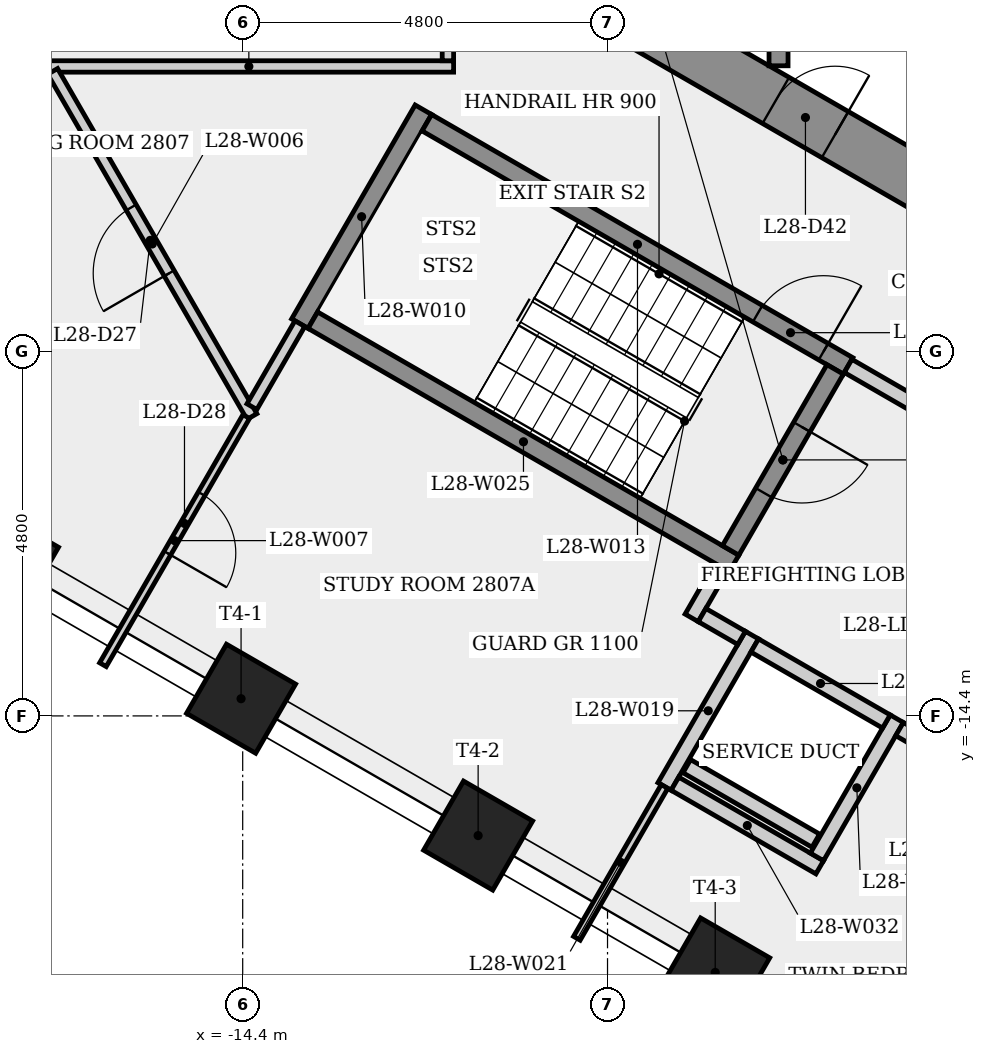
"""IFC4 building model, lengths in metres.
Left out: names, types, materials, properties, quantities, classifications, styles, units other than length and angle.
Written with IfcOpenShell. Run it as: python <this file> out.ifc"""

import sys

from ifc_helpers import new_model, si_unit, direction, frame, frame_2d, origin, origin_2d, place, context, subcontext, project, spatial, rectangle, extrude, element, fill, save


model = new_model("IFC4")
c1 = context("Model", 3, precision=1e-05, world=origin(), true_north=direction((0.0, 1.0)))
c2 = subcontext(c1, "Body", "Model", "MODEL_VIEW")
j1 = project(units=[si_unit("LENGTHUNIT", "METRE"), si_unit("PLANEANGLEUNIT", "RADIAN")], contexts=[c1])
p1 = place(None, origin())
s1 = spatial("IfcSite", under=j1, at=p1, CompositionType="ELEMENT")
p2 = place(p1, origin())
s2 = spatial("IfcBuilding", under=s1, at=p2, CompositionType="ELEMENT")
p3 = place(p2, frame((0.0, 0.0, 106.9)))
s3 = spatial("IfcBuildingStorey", under=s2, at=p3, CompositionType="ELEMENT", Elevation=106.9)
p4 = place(p3, frame((-9.325, -5.182, 0.0), z_axis=(0.0, 0.0, 1.0), x_axis=(0.866023993627, -0.500002442456, 0.0)))
e1 = element("IfcWall", 1, at=p4, inside=s3, PredefinedType="SHEAR", context=c2, shape_type="SweptSolid", body=[
    extrude(rectangle(XDim=10.97, YDim=0.7, at=frame_2d((5.485, 0.0))), origin(), (0.0, 0.0, 1.0), 3.4),
])
p5 = place(p4, frame((2.239, 0.0, 0.0)))
e2 = element("IfcOpeningElement", 2, at=p5, cuts=e1, PredefinedType="OPENING", context=c2, shape_type="SweptSolid", body=[
    extrude(rectangle(XDim=0.9, YDim=2.1, at=frame_2d((0.45, 1.05))), frame((0.0, 0.36, 0.0), z_axis=(0.0, -1.0, 0.0), x_axis=(1.0, 0.0, 0.0)), (0.0, 0.0, 1.0), 0.72),
])
p6 = place(p4, frame((8.96, 0.0, 0.0)))
e3 = element("IfcOpeningElement", 3, at=p6, cuts=e1, PredefinedType="OPENING", context=c2, shape_type="SweptSolid", body=[
    extrude(rectangle(XDim=0.9, YDim=2.1, at=frame_2d((0.45, 1.05))), frame((0.0, 0.36, 0.0), z_axis=(0.0, -1.0, 0.0), x_axis=(1.0, 0.0, 0.0)), (0.0, 0.0, 1.0), 0.72),
])
for number, where, z_axis, x_axis in (
    (4, (-17.541, -12.373, 0.0), (0.0, 0.0, 1.0), (-0.5, -0.866, 0.0)),
    (5, (-14.421, -14.174, 0.0), (0.0, 0.0, 1.0), (-0.5, -0.866, 0.0)),
    (6, (-11.302, -15.975, 0.0), (0.0, 0.0, 1.0), (-0.5, -0.866, 0.0)),
    (7, (-8.183, -17.775, 0.0), (0.0, 0.0, 1.0), (-0.5, -0.866, 0.0)),
):
    element("IfcColumn", number, at=place(p3, frame(where, z_axis=z_axis, x_axis=x_axis)), inside=s3, PredefinedType="COLUMN", context=c2, shape_type="SweptSolid", body=[
        extrude(rectangle(XDim=1.05, YDim=1.05, at=origin_2d()), origin(), (0.0, 0.0, 1.0), 3.4),
    ])
p7 = place(p3, frame((-17.013, -5.855, 0.0), z_axis=(0.0, 0.0, 1.0), x_axis=(1.0, 0.0, 0.0)))
e8 = element("IfcWall", 8, at=p7, inside=s3, PredefinedType="PARTITIONING", context=c2, shape_type="SweptSolid", body=[
    extrude(rectangle(XDim=5.388, YDim=0.15, at=frame_2d((2.694, 0.0))), origin(), (0.0, 0.0, 1.0), 3.05),
])
p8 = place(p3, frame((-14.279, -10.461, 0.0), z_axis=(0.0, 0.0, 1.0), x_axis=(-0.49998979122, 0.866031297746, 0.0)))
e9 = element("IfcWall", 9, at=p8, inside=s3, PredefinedType="PARTITIONING", context=c2, shape_type="SweptSolid", body=[
    extrude(rectangle(XDim=5.244, YDim=0.15, at=frame_2d((2.622, 0.0))), origin(), (0.0, 0.0, 1.0), 3.05),
])
p9 = place(p8, frame((2.177, 0.0, 0.0)))
e10 = element("IfcOpeningElement", 10, at=p9, cuts=e9, PredefinedType="OPENING", context=c2, shape_type="SweptSolid", body=[
    extrude(rectangle(XDim=1.0, YDim=2.1, at=frame_2d((0.5, 1.05))), frame((0.0, 0.085, 0.0), z_axis=(0.0, -1.0, 0.0), x_axis=(1.0, 0.0, 0.0)), (0.0, 0.0, 1.0), 0.17),
])
p10 = place(p3, frame((-14.354, -10.461, 0.0), z_axis=(0.0, 0.0, 1.0), x_axis=(-0.499997093526, -0.866027081832, 0.0)))
e11 = element("IfcWall", 11, at=p10, inside=s3, PredefinedType="PARTITIONING", context=c2, shape_type="SweptSolid", body=[
    extrude(rectangle(XDim=3.771, YDim=0.1, at=frame_2d((1.885, 0.0))), origin(), (0.0, 0.0, 1.0), 3.05),
])
p11 = place(p10, frame((1.175, 0.0, 0.0)))
e12 = element("IfcOpeningElement", 12, at=p11, cuts=e11, PredefinedType="OPENING", context=c2, shape_type="SweptSolid", body=[
    extrude(rectangle(XDim=0.9, YDim=2.1, at=frame_2d((0.45, 1.05))), frame((0.0, 0.06, 0.0), z_axis=(0.0, -1.0, 0.0), x_axis=(1.0, 0.0, 0.0)), (0.0, 0.0, 1.0), 0.12),
])
p12 = place(p3, frame((-13.648, -9.239, 0.0), z_axis=(0.0, 0.0, 1.0), x_axis=(0.500017246033, 0.866015446554, 0.0)))
e13 = element("IfcWall", 13, at=p12, inside=s3, PredefinedType="SHEAR", context=c2, shape_type="SweptSolid", body=[
    extrude(rectangle(XDim=3.25, YDim=0.25, at=frame_2d((1.625, 0.0))), origin(), (0.0, 0.0, 1.0), 3.05),
])
p13 = place(p3, frame((-13.648, -9.239, 0.0), z_axis=(0.0, 0.0, 1.0), x_axis=(-0.50013570633, -0.86594703952, 0.0)))
e14 = element("IfcWall", 14, at=p13, inside=s3, PredefinedType="PARTITIONING", context=c2, shape_type="SweptSolid", body=[
    extrude(rectangle(XDim=1.261, YDim=0.15, at=frame_2d((0.631, 0.0))), origin(), (0.0, 0.0, 1.0), 3.05),
])
p14 = place(p3, frame((-11.977, -6.595, 0.0), z_axis=(0.0, 0.0, 1.0), x_axis=(0.866025499775, -0.499999833739, 0.0)))
e15 = element("IfcWall", 15, at=p14, inside=s3, PredefinedType="SHEAR", context=c2, shape_type="SweptSolid", body=[
    extrude(rectangle(XDim=6.4, YDim=0.25, at=frame_2d((3.2, 0.0))), origin(), (0.0, 0.0, 1.0), 3.05),
])
p15 = place(p14, frame((5.025, 0.0, 0.0)))
e16 = element("IfcOpeningElement", 16, at=p15, cuts=e15, PredefinedType="OPENING", context=c2, shape_type="SweptSolid", body=[
    extrude(rectangle(XDim=1.0, YDim=2.1, at=frame_2d((0.5, 1.05))), frame((0.0, 0.135, 0.0), z_axis=(0.0, -1.0, 0.0), x_axis=(1.0, 0.0, 0.0)), (0.0, 0.0, 1.0), 0.27),
])
p16 = place(p3, frame((-11.7, 5.93, 0.0), z_axis=(0.0, 0.0, 1.0), x_axis=(0.0, -1.0, 0.0)))
e17 = element("IfcWall", 17, at=p16, inside=s3, PredefinedType="PARTITIONING", context=c2, shape_type="SweptSolid", body=[
    extrude(rectangle(XDim=11.709, YDim=0.15, at=frame_2d((5.855, 0.0))), origin(), (0.0, 0.0, 1.0), 3.05),
])
p17 = place(p16, frame((7.359, 0.0, 0.0)))
e18 = element("IfcOpeningElement", 18, at=p17, cuts=e17, PredefinedType="OPENING", context=c2, shape_type="SweptSolid", body=[
    extrude(rectangle(XDim=1.0, YDim=2.1, at=frame_2d((0.5, 1.05))), frame((0.0, 0.085, 0.0), z_axis=(0.0, -1.0, 0.0), x_axis=(1.0, 0.0, 0.0)), (0.0, 0.0, 1.0), 0.17),
])
p18 = place(p3, frame((-8.85, -15.329, 0.0), z_axis=(0.0, 0.0, 1.0), x_axis=(0.500077740698, 0.865980515519, 0.0)))
e19 = element("IfcWall", 19, at=p18, inside=s3, PredefinedType="PLUMBINGWALL", context=c2, shape_type="SweptSolid", body=[
    extrude(rectangle(XDim=2.3, YDim=0.2, at=frame_2d((1.15, 0.0))), origin(), (0.0, 0.0, 1.0), 3.05),
])
p19 = place(p3, frame((-8.85, -15.329, 0.0), z_axis=(0.0, 0.0, 1.0), x_axis=(-0.500009533716, -0.866019899421, 0.0)))
e20 = element("IfcWall", 20, at=p19, inside=s3, PredefinedType="PARTITIONING", context=c2, shape_type="SweptSolid", body=[
    extrude(rectangle(XDim=2.307, YDim=0.1, at=frame_2d((1.153, 0.0))), origin(), (0.0, 0.0, 1.0), 3.05),
])
p20 = place(p3, frame((-8.493, -13.11, 0.0), z_axis=(0.0, 0.0, 1.0), x_axis=(0.500067724834, 0.865986299303, 0.0)))
e21 = element("IfcWall", 21, at=p20, inside=s3, PredefinedType="PARTITIONING", context=c2, shape_type="SweptSolid", body=[
    extrude(rectangle(XDim=0.775, YDim=0.2, at=frame_2d((0.388, 0.0))), origin(), (0.0, 0.0, 1.0), 3.05),
])
p21 = place(p3, frame((-7.935, -12.393, 0.0), z_axis=(0.0, 0.0, 1.0), x_axis=(-0.866025499775, 0.499999833739, 0.0)))
e22 = element("IfcWall", 22, at=p21, inside=s3, PredefinedType="SHEAR", context=c2, shape_type="SweptSolid", body=[
    extrude(rectangle(XDim=6.4, YDim=0.25, at=frame_2d((3.2, 0.0))), origin(), (0.0, 0.0, 1.0), 3.05),
])
p22 = place(p3, frame((-7.836, -13.373, 0.0), z_axis=(0.0, 0.0, 1.0), x_axis=(-0.866232998003, 0.499640263761, 0.0)))
e23 = element("IfcWall", 23, at=p22, inside=s3, PredefinedType="PARTITIONING", context=c2, shape_type="SweptSolid", body=[
    extrude(rectangle(XDim=0.6, YDim=0.2, at=frame_2d((0.3, 0.0))), origin(), (0.0, 0.0, 1.0), 3.05),
])
p23 = place(p3, frame((-7.35, -5.846, 0.0), z_axis=(0.0, 0.0, 1.0), x_axis=(0.0, 1.0, 0.0)))
e24 = element("IfcWall", 24, at=p23, inside=s3, PredefinedType="SHEAR", context=c2, shape_type="SweptSolid", body=[
    extrude(rectangle(XDim=4.171, YDim=0.25, at=frame_2d((2.085, 0.0))), origin(), (0.0, 0.0, 1.0), 3.05),
])
p24 = place(p3, frame((-6.808, -16.392, 0.0), z_axis=(0.0, 0.0, 1.0), x_axis=(-0.866008176907, 0.50002983664, 0.0)))
e25 = element("IfcWall", 25, at=p24, inside=s3, PredefinedType="PLUMBINGWALL", context=c2, shape_type="SweptSolid", body=[
    extrude(rectangle(XDim=2.2, YDim=0.2, at=frame_2d((1.1, 0.0))), origin(), (0.0, 0.0, 1.0), 3.05),
])
p25 = place(p3, frame((-6.605, -9.841, 0.0), z_axis=(0.0, 0.0, 1.0), x_axis=(-0.499996545922, -0.866027397988, 0.0)))
e26 = element("IfcWall", 26, at=p25, inside=s3, PredefinedType="SHEAR", context=c2, shape_type="SweptSolid", body=[
    extrude(rectangle(XDim=2.75, YDim=0.25, at=frame_2d((1.375, 0.0))), origin(), (0.0, 0.0, 1.0), 3.05),
])
p26 = place(p25, frame((0.875, 0.0, 0.0)))
e27 = element("IfcOpeningElement", 27, at=p26, cuts=e26, PredefinedType="OPENING", context=c2, shape_type="SweptSolid", body=[
    extrude(rectangle(XDim=1.0, YDim=2.1, at=frame_2d((0.5, 1.05))), frame((0.0, 0.135, 0.0), z_axis=(0.0, -1.0, 0.0), x_axis=(1.0, 0.0, 0.0)), (0.0, 0.0, 1.0), 0.27),
])
p27 = place(p3, frame((-6.435, -9.795, 0.0), z_axis=(0.0, 0.0, 1.0), x_axis=(0.866012907634, -0.500021643343, 0.0)))
e28 = element("IfcWall", 28, at=p27, inside=s3, PredefinedType="PARTITIONING", context=c2, shape_type="SweptSolid", body=[
    extrude(rectangle(XDim=4.45, YDim=0.2, at=frame_2d((2.225, 0.0))), origin(), (0.0, 0.0, 1.0), 3.05),
])
p28 = place(p27, frame((1.675, 0.0, 0.0)))
e29 = element("IfcOpeningElement", 29, at=p28, cuts=e28, PredefinedType="OPENING", context=c2, shape_type="SweptSolid", body=[
    extrude(rectangle(XDim=1.1, YDim=2.1, at=frame_2d((0.55, 1.05))), frame((0.0, 0.11, 0.0), z_axis=(0.0, -1.0, 0.0), x_axis=(1.0, 0.0, 0.0)), (0.0, 0.0, 1.0), 0.22),
])
p29 = place(p3, frame((-5.795, -14.437, 0.0), z_axis=(0.0, 0.0, 1.0), x_axis=(-0.500027713859, -0.866009402589, 0.0)))
e30 = element("IfcWall", 30, at=p29, inside=s3, PredefinedType="PLUMBINGWALL", context=c2, shape_type="SweptSolid", body=[
    extrude(rectangle(XDim=2.1, YDim=0.2, at=frame_2d((1.05, 0.0))), origin(), (0.0, 0.0, 1.0), 3.05),
])
p30 = place(p3, frame((-5.931, -14.473, 0.0), z_axis=(0.0, 0.0, 1.0), x_axis=(-0.866041268327, 0.499972520799, 0.0)))
e31 = element("IfcWall", 31, at=p30, inside=s3, PredefinedType="PLUMBINGWALL", context=c2, shape_type="SweptSolid", body=[
    extrude(rectangle(XDim=2.0, YDim=0.2, at=frame_2d((1.0, 0.0))), origin(), (0.0, 0.0, 1.0), 3.05),
])
p31 = place(p3, frame((-4.286, -15.423, 0.0), z_axis=(0.0, 0.0, 1.0), x_axis=(-0.866025371046, 0.500000056704, 0.0)))
e32 = element("IfcWall", 32, at=p31, inside=s3, PredefinedType="PARTITIONING", context=c2, shape_type="SweptSolid", body=[
    extrude(rectangle(XDim=1.7, YDim=0.2, at=frame_2d((0.85, 0.0))), origin(), (0.0, 0.0, 1.0), 3.05),
])
p32 = place(p3, frame((-6.86, -16.042, 0.0), z_axis=(0.0, 0.0, 1.0), x_axis=(-0.866042469362, 0.499970440388, 0.0)))
e33 = element("IfcWall", 33, at=p32, inside=s3, PredefinedType="PLUMBINGWALL", context=c2, shape_type="SweptSolid", body=[
    extrude(rectangle(XDim=1.96, YDim=0.2, at=frame_2d((0.98, 0.0))), origin(), (0.0, 0.0, 1.0), 3.05),
])
p33 = place(p15, origin())
e34 = element("IfcDoor", 34, at=p33, inside=s3, OperationType="SINGLE_SWING_RIGHT", PredefinedType="DOOR", context=c2, shape_type="SweptSolid", body=[
    extrude(rectangle(XDim=1.0, YDim=2.1, at=frame_2d((0.5, 1.05))), frame((0.0, 0.025, 0.0), z_axis=(0.0, -1.0, 0.0), x_axis=(1.0, 0.0, 0.0)), (0.0, 0.0, 1.0), 0.05),
])
fill(e16, e34)
p34 = place(p26, origin())
e35 = element("IfcDoor", 35, at=p34, inside=s3, OperationType="SINGLE_SWING_LEFT", PredefinedType="DOOR", context=c2, shape_type="SweptSolid", body=[
    extrude(rectangle(XDim=1.0, YDim=2.1, at=frame_2d((0.5, 1.05))), frame((0.0, 0.025, 0.0), z_axis=(0.0, -1.0, 0.0), x_axis=(1.0, 0.0, 0.0)), (0.0, 0.0, 1.0), 0.05),
])
fill(e27, e35)
p35 = place(p9, origin())
e36 = element("IfcDoor", 36, at=p35, inside=s3, OperationType="SINGLE_SWING_LEFT", PredefinedType="DOOR", context=c2, shape_type="SweptSolid", body=[
    extrude(rectangle(XDim=1.0, YDim=2.1, at=frame_2d((0.5, 1.05))), frame((0.0, 0.025, 0.0), z_axis=(0.0, -1.0, 0.0), x_axis=(1.0, 0.0, 0.0)), (0.0, 0.0, 1.0), 0.05),
])
fill(e10, e36)
p36 = place(p11, origin())
e37 = element("IfcDoor", 37, at=p36, inside=s3, OperationType="SINGLE_SWING_RIGHT", PredefinedType="DOOR", context=c2, shape_type="SweptSolid", body=[
    extrude(rectangle(XDim=0.9, YDim=2.1, at=frame_2d((0.45, 1.05))), frame((0.0, 0.025, 0.0), z_axis=(0.0, -1.0, 0.0), x_axis=(1.0, 0.0, 0.0)), (0.0, 0.0, 1.0), 0.05),
])
fill(e12, e37)
p37 = place(p5, origin())
e38 = element("IfcDoor", 38, at=p37, inside=s3, OperationType="SINGLE_SWING_RIGHT", PredefinedType="DOOR", context=c2, shape_type="SweptSolid", body=[
    extrude(rectangle(XDim=0.9, YDim=2.1, at=frame_2d((0.45, 1.05))), frame((0.0, 0.025, 0.0), z_axis=(0.0, -1.0, 0.0), x_axis=(1.0, 0.0, 0.0)), (0.0, 0.0, 1.0), 0.05),
])
fill(e2, e38)
save(model, sys.argv[1])
